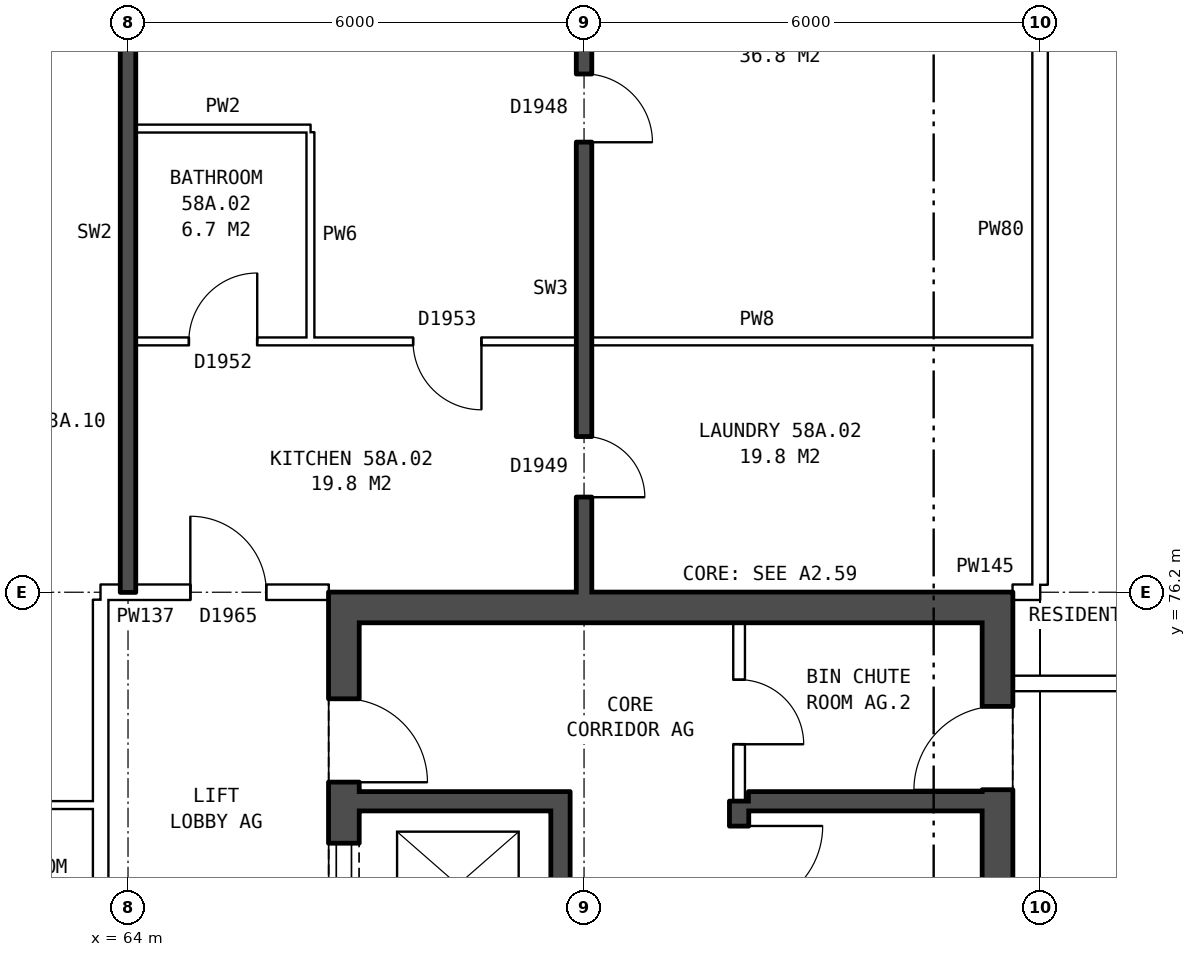
"""IFC4 building model, lengths in metres.
Left out: names, types, materials, properties, quantities, classifications, styles, units other than length and angle.
Written with IfcOpenShell. Run it as: python <this file> out.ifc"""

import sys

from ifc_helpers import new_model, si_unit, direction, frame, frame_2d, origin, place, context, subcontext, project, spatial, rectangle, extrude, element, fill, save


model = new_model("IFC4")
c1 = context("Model", 3, precision=1e-05, world=origin(), true_north=direction((0.0, 1.0)))
c2 = subcontext(c1, "Body", "Model", "MODEL_VIEW")
j1 = project(units=[si_unit("LENGTHUNIT", "METRE"), si_unit("PLANEANGLEUNIT", "RADIAN")], contexts=[c1])
p1 = place(None, origin())
s1 = spatial("IfcSite", under=j1, at=p1, CompositionType="ELEMENT")
p2 = place(p1, origin())
s2 = spatial("IfcBuilding", under=s1, at=p2, CompositionType="ELEMENT")
p3 = place(p2, frame((0.0, 0.0, 205.9)))
s3 = spatial("IfcBuildingStorey", under=s2, at=p3, CompositionType="ELEMENT", Elevation=205.9)
p4 = place(p3, frame((66.84, 63.8, 0.0), z_axis=(0.0, 0.0, 1.0), x_axis=(0.0, 1.0, 0.0)))
e1 = element("IfcWall", 1, at=p4, inside=s3, PredefinedType="SHEAR", context=c2, shape_type="SweptSolid", body=[
    extrude(rectangle(XDim=12.4, YDim=0.4, at=frame_2d((6.2, 0.0))), origin(), (0.0, 0.0, 1.0), 2.85),
])
p5 = place(p4, frame((1.325, 0.0, 0.0)))
e2 = element("IfcOpeningElement", 2, at=p5, cuts=e1, PredefinedType="OPENING", context=c2, shape_type="SweptSolid", body=[
    extrude(rectangle(XDim=1.1, YDim=2.1, at=frame_2d((0.55, 1.05))), frame((0.0, 0.21, 0.0), z_axis=(0.0, -1.0, 0.0), x_axis=(1.0, 0.0, 0.0)), (0.0, 0.0, 1.0), 0.42),
])
p6 = place(p4, frame((3.6, 0.0, 0.0)))
e3 = element("IfcOpeningElement", 3, at=p6, cuts=e1, PredefinedType="OPENING", context=c2, shape_type="SweptSolid", body=[
    extrude(rectangle(XDim=1.1, YDim=2.1, at=frame_2d((0.55, 1.05))), frame((0.0, 0.21, 0.0), z_axis=(0.0, -1.0, 0.0), x_axis=(1.0, 0.0, 0.0)), (0.0, 0.0, 1.0), 0.42),
])
p7 = place(p4, frame((5.8, 0.0, 0.0)))
e4 = element("IfcOpeningElement", 4, at=p7, cuts=e1, PredefinedType="OPENING", context=c2, shape_type="SweptSolid", body=[
    extrude(rectangle(XDim=1.1, YDim=2.1, at=frame_2d((0.55, 1.05))), frame((0.0, 0.21, 0.0), z_axis=(0.0, -1.0, 0.0), x_axis=(1.0, 0.0, 0.0)), (0.0, 0.0, 1.0), 0.42),
])
p8 = place(p4, frame((8.0, 0.0, 0.0)))
e5 = element("IfcOpeningElement", 5, at=p8, cuts=e1, PredefinedType="OPENING", context=c2, shape_type="SweptSolid", body=[
    extrude(rectangle(XDim=1.1, YDim=2.1, at=frame_2d((0.55, 1.05))), frame((0.0, 0.21, 0.0), z_axis=(0.0, -1.0, 0.0), x_axis=(1.0, 0.0, 0.0)), (0.0, 0.0, 1.0), 0.42),
])
p9 = place(p4, frame((9.9, 0.0, 0.0)))
e6 = element("IfcOpeningElement", 6, at=p9, cuts=e1, PredefinedType="OPENING", context=c2, shape_type="SweptSolid", body=[
    extrude(rectangle(XDim=1.1, YDim=2.1, at=frame_2d((0.55, 1.05))), frame((0.0, 0.21, 0.0), z_axis=(0.0, -1.0, 0.0), x_axis=(1.0, 0.0, 0.0)), (0.0, 0.0, 1.0), 0.42),
])
p10 = place(p3, frame((75.44, 63.8, 0.0), z_axis=(0.0, 0.0, 1.0), x_axis=(0.0, 1.0, 0.0)))
e7 = element("IfcWall", 7, at=p10, inside=s3, PredefinedType="SHEAR", context=c2, shape_type="SweptSolid", body=[
    extrude(rectangle(XDim=12.4, YDim=0.4, at=frame_2d((6.2, 0.0))), origin(), (0.0, 0.0, 1.0), 2.85),
])
p11 = place(p10, frame((9.8, 0.0, 0.0)))
e8 = element("IfcOpeningElement", 8, at=p11, cuts=e7, PredefinedType="OPENING", context=c2, shape_type="SweptSolid", body=[
    extrude(rectangle(XDim=1.1, YDim=2.1, at=frame_2d((0.55, 1.05))), frame((0.0, 0.21, 0.0), z_axis=(0.0, -1.0, 0.0), x_axis=(1.0, 0.0, 0.0)), (0.0, 0.0, 1.0), 0.42),
])
p12 = place(p3, frame((67.04, 76.0, 0.0), z_axis=(0.0, 0.0, 1.0), x_axis=(1.0, 0.0, 0.0)))
e9 = element("IfcWall", 9, at=p12, inside=s3, PredefinedType="SHEAR", context=c2, shape_type="SweptSolid", body=[
    extrude(rectangle(XDim=8.2, YDim=0.4, at=frame_2d((4.1, 0.0))), origin(), (0.0, 0.0, 1.0), 2.85),
])
p13 = place(p3, frame((67.04, 73.45, 0.0), z_axis=(0.0, 0.0, 1.0), x_axis=(1.0, 0.0, 0.0)))
e10 = element("IfcWall", 10, at=p13, inside=s3, PredefinedType="SHEAR", context=c2, shape_type="SweptSolid", body=[
    extrude(rectangle(XDim=2.525, YDim=0.25, at=frame_2d((1.262, 0.0))), origin(), (0.0, 0.0, 1.0), 2.85),
])
p14 = place(p3, frame((72.165, 73.45, 0.0), z_axis=(0.0, 0.0, 1.0), x_axis=(1.0, 0.0, 0.0)))
e11 = element("IfcWall", 11, at=p14, inside=s3, PredefinedType="SHEAR", context=c2, shape_type="SweptSolid", body=[
    extrude(rectangle(XDim=3.075, YDim=0.25, at=frame_2d((1.538, 0.0))), origin(), (0.0, 0.0, 1.0), 2.85),
])
p15 = place(p3, frame((69.69, 66.975, 0.0), z_axis=(0.0, 0.0, 1.0), x_axis=(0.0, 1.0, 0.0)))
e12 = element("IfcWall", 12, at=p15, inside=s3, PredefinedType="SHEAR", context=c2, shape_type="SweptSolid", body=[
    extrude(rectangle(XDim=6.6, YDim=0.25, at=frame_2d((3.3, 0.0))), origin(), (0.0, 0.0, 1.0), 2.85),
])
p16 = place(p3, frame((72.04, 66.225, 0.0), z_axis=(0.0, 0.0, 1.0), x_axis=(0.0, 1.0, 0.0)))
e13 = element("IfcWall", 13, at=p16, inside=s3, PredefinedType="SHEAR", context=c2, shape_type="SweptSolid", body=[
    extrude(rectangle(XDim=7.225, YDim=0.25, at=frame_2d((3.612, 0.0))), origin(), (0.0, 0.0, 1.0), 2.85),
])
p17 = place(p16, frame((5.8, 0.0, 0.0)))
e14 = element("IfcOpeningElement", 14, at=p17, cuts=e13, PredefinedType="OPENING", context=c2, shape_type="SweptSolid", body=[
    extrude(rectangle(XDim=1.1, YDim=2.1, at=frame_2d((0.55, 1.05))), frame((0.0, 0.135, 0.0), z_axis=(0.0, -1.0, 0.0), x_axis=(1.0, 0.0, 0.0)), (0.0, 0.0, 1.0), 0.27),
])
p18 = place(p3, frame((72.04, 73.45, 0.0), z_axis=(0.0, 0.0, 1.0), x_axis=(0.0, 1.0, 0.0)))
e15 = element("IfcWall", 15, at=p18, inside=s3, PredefinedType="PARTITIONING", context=c2, shape_type="SweptSolid", body=[
    extrude(rectangle(XDim=2.35, YDim=0.15, at=frame_2d((1.175, 0.0))), origin(), (0.0, 0.0, 1.0), 2.85),
])
p19 = place(p18, frame((0.75, 0.0, 0.0)))
e16 = element("IfcOpeningElement", 16, at=p19, cuts=e15, PredefinedType="OPENING", context=c2, shape_type="SweptSolid", body=[
    extrude(rectangle(XDim=0.85, YDim=2.1, at=frame_2d((0.425, 1.05))), frame((0.0, 0.085, 0.0), z_axis=(0.0, -1.0, 0.0), x_axis=(1.0, 0.0, 0.0)), (0.0, 0.0, 1.0), 0.17),
])
p20 = place(p3, frame((63.64, 63.9, 0.0), z_axis=(0.0, 0.0, 1.0), x_axis=(0.0, 1.0, 0.0)))
e17 = element("IfcWall", 17, at=p20, inside=s3, PredefinedType="PARTITIONING", context=c2, shape_type="SweptSolid", body=[
    extrude(rectangle(XDim=12.2, YDim=0.2, at=frame_2d((6.1, 0.0))), origin(), (0.0, 0.0, 1.0), 2.85),
])
p21 = place(p20, frame((5.1, 0.0, 0.0)))
e18 = element("IfcOpeningElement", 18, at=p21, cuts=e17, PredefinedType="OPENING", context=c2, shape_type="SweptSolid", body=[
    extrude(rectangle(XDim=2.0, YDim=2.1, at=frame_2d((1.0, 1.05))), frame((0.0, 0.11, 0.0), z_axis=(0.0, -1.0, 0.0), x_axis=(1.0, 0.0, 0.0)), (0.0, 0.0, 1.0), 0.22),
])
p22 = place(p3, frame((61.0, 73.4, 0.0), z_axis=(0.0, 0.0, 1.0), x_axis=(1.0, 0.0, 0.0)))
e19 = element("IfcWall", 19, at=p22, inside=s3, PredefinedType="PARTITIONING", context=c2, shape_type="SweptSolid", body=[
    extrude(rectangle(XDim=2.64, YDim=0.1, at=frame_2d((1.32, 0.0))), origin(), (0.0, 0.0, 1.0), 2.85),
])
p23 = place(p3, frame((75.64, 75.0, 0.0), z_axis=(0.0, 0.0, 1.0), x_axis=(1.0, 0.0, 0.0)))
e20 = element("IfcWall", 20, at=p23, inside=s3, PredefinedType="PARTITIONING", context=c2, shape_type="SweptSolid", body=[
    extrude(rectangle(XDim=7.585, YDim=0.2, at=frame_2d((3.792, 0.0))), origin(), (0.0, 0.0, 1.0), 2.85),
])
p24 = place(p23, frame((3.343, 0.0, 0.0)))
e21 = element("IfcOpeningElement", 21, at=p24, cuts=e20, PredefinedType="OPENING", context=c2, shape_type="SweptSolid", body=[
    extrude(rectangle(XDim=0.9, YDim=2.1, at=frame_2d((0.45, 1.05))), frame((0.0, 0.11, 0.0), z_axis=(0.0, -1.0, 0.0), x_axis=(1.0, 0.0, 0.0)), (0.0, 0.0, 1.0), 0.22),
])
p25 = place(p3, frame((63.64, 76.2, 0.0), z_axis=(0.0, 0.0, 1.0), x_axis=(1.0, 0.0, 0.0)))
e22 = element("IfcWall", 22, at=p25, inside=s3, PredefinedType="PARTITIONING", context=c2, shape_type="SweptSolid", body=[
    extrude(rectangle(XDim=3.0, YDim=0.2, at=frame_2d((1.5, 0.0))), origin(), (0.0, 0.0, 1.0), 2.85),
])
p26 = place(p25, frame((1.18, 0.0, 0.0)))
e23 = element("IfcOpeningElement", 23, at=p26, cuts=e22, PredefinedType="OPENING", context=c2, shape_type="SweptSolid", body=[
    extrude(rectangle(XDim=1.0, YDim=2.1, at=frame_2d((0.5, 1.05))), frame((0.0, 0.11, 0.0), z_axis=(0.0, -1.0, 0.0), x_axis=(1.0, 0.0, 0.0)), (0.0, 0.0, 1.0), 0.22),
])
p27 = place(p3, frame((75.64, 76.2, 0.0), z_axis=(0.0, 0.0, 1.0), x_axis=(1.0, 0.0, 0.0)))
e24 = element("IfcWall", 24, at=p27, inside=s3, PredefinedType="PARTITIONING", context=c2, shape_type="SweptSolid", body=[
    extrude(rectangle(XDim=0.36, YDim=0.2, at=frame_2d((0.18, 0.0))), origin(), (0.0, 0.0, 1.0), 2.85),
])
p28 = place(p3, frame((64.1, 79.5, 0.0), z_axis=(0.0, 0.0, 1.0), x_axis=(1.0, 0.0, 0.0)))
e25 = element("IfcWall", 25, at=p28, inside=s3, PredefinedType="PARTITIONING", context=c2, shape_type="SweptSolid", body=[
    extrude(rectangle(XDim=11.8, YDim=0.1, at=frame_2d((5.9, 0.0))), origin(), (0.0, 0.0, 1.0), 2.85),
])
p29 = place(p28, frame((3.65, 0.0, 0.0)))
e26 = element("IfcOpeningElement", 26, at=p29, cuts=e25, PredefinedType="OPENING", context=c2, shape_type="SweptSolid", body=[
    extrude(rectangle(XDim=0.9, YDim=2.1, at=frame_2d((0.45, 1.05))), frame((0.0, 0.06, 0.0), z_axis=(0.0, -1.0, 0.0), x_axis=(1.0, 0.0, 0.0)), (0.0, 0.0, 1.0), 0.12),
])
p30 = place(p28, frame((0.7, 0.0, 0.0)))
e27 = element("IfcOpeningElement", 27, at=p30, cuts=e25, PredefinedType="OPENING", context=c2, shape_type="SweptSolid", body=[
    extrude(rectangle(XDim=0.9, YDim=2.1, at=frame_2d((0.45, 1.05))), frame((0.0, 0.06, 0.0), z_axis=(0.0, -1.0, 0.0), x_axis=(1.0, 0.0, 0.0)), (0.0, 0.0, 1.0), 0.12),
])
p31 = place(p3, frame((64.1, 82.3, 0.0), z_axis=(0.0, 0.0, 1.0), x_axis=(1.0, 0.0, 0.0)))
e28 = element("IfcWall", 28, at=p31, inside=s3, PredefinedType="PARTITIONING", context=c2, shape_type="SweptSolid", body=[
    extrude(rectangle(XDim=2.3, YDim=0.1, at=frame_2d((1.15, 0.0))), origin(), (0.0, 0.0, 1.0), 2.85),
])
p32 = place(p3, frame((64.0, 76.2, 0.0), z_axis=(0.0, 0.0, 1.0), x_axis=(0.0, 1.0, 0.0)))
e29 = element("IfcWall", 29, at=p32, inside=s3, PredefinedType="SOLIDWALL", context=c2, shape_type="SweptSolid", body=[
    extrude(rectangle(XDim=9.44, YDim=0.2, at=frame_2d((4.72, 0.0))), origin(), (0.0, 0.0, 1.0), 2.85),
])
p33 = place(p3, frame((66.4, 79.55, 0.0), z_axis=(0.0, 0.0, 1.0), x_axis=(0.0, 1.0, 0.0)))
e30 = element("IfcWall", 30, at=p33, inside=s3, PredefinedType="PARTITIONING", context=c2, shape_type="SweptSolid", body=[
    extrude(rectangle(XDim=2.7, YDim=0.1, at=frame_2d((1.35, 0.0))), origin(), (0.0, 0.0, 1.0), 2.85),
])
p34 = place(p3, frame((70.0, 76.2, 0.0), z_axis=(0.0, 0.0, 1.0), x_axis=(0.0, 1.0, 0.0)))
e31 = element("IfcWall", 31, at=p34, inside=s3, PredefinedType="SOLIDWALL", context=c2, shape_type="SweptSolid", body=[
    extrude(rectangle(XDim=9.44, YDim=0.2, at=frame_2d((4.72, 0.0))), origin(), (0.0, 0.0, 1.0), 2.85),
])
p35 = place(p34, frame((5.92, 0.0, 0.0)))
e32 = element("IfcOpeningElement", 32, at=p35, cuts=e31, PredefinedType="OPENING", context=c2, shape_type="SweptSolid", body=[
    extrude(rectangle(XDim=0.9, YDim=2.1, at=frame_2d((0.45, 1.05))), frame((0.0, 0.11, 0.0), z_axis=(0.0, -1.0, 0.0), x_axis=(1.0, 0.0, 0.0)), (0.0, 0.0, 1.0), 0.22),
])
p36 = place(p34, frame((1.25, 0.0, 0.0)))
e33 = element("IfcOpeningElement", 33, at=p36, cuts=e31, PredefinedType="OPENING", context=c2, shape_type="SweptSolid", body=[
    extrude(rectangle(XDim=0.8, YDim=2.1, at=frame_2d((0.4, 1.05))), frame((0.0, 0.11, 0.0), z_axis=(0.0, -1.0, 0.0), x_axis=(1.0, 0.0, 0.0)), (0.0, 0.0, 1.0), 0.22),
])
p37 = place(p3, frame((76.0, 76.3, 0.0), z_axis=(0.0, 0.0, 1.0), x_axis=(0.0, 1.0, 0.0)))
e34 = element("IfcWall", 34, at=p37, inside=s3, PredefinedType="PARTITIONING", context=c2, shape_type="SweptSolid", body=[
    extrude(rectangle(XDim=9.34, YDim=0.2, at=frame_2d((4.67, 0.0))), origin(), (0.0, 0.0, 1.0), 2.85),
])
p38 = place(p8, origin())
e35 = element("IfcDoor", 35, at=p38, inside=s3, OperationType="DOUBLE_DOOR_SLIDING", PredefinedType="DOOR", context=c2, shape_type="SweptSolid", body=[
    extrude(rectangle(XDim=1.1, YDim=2.1, at=frame_2d((0.55, 1.05))), frame((0.0, -0.135, 0.0), z_axis=(0.0, -1.0, 0.0), x_axis=(1.0, 0.0, 0.0)), (0.0, 0.0, 1.0), 0.05),
])
fill(e5, e35)
p39 = place(p9, frame((1.1, 0.0, 0.0), z_axis=(0.0, 0.0, 1.0), x_axis=(-1.0, 0.0, 0.0)))
e36 = element("IfcDoor", 36, at=p39, inside=s3, OperationType="SINGLE_SWING_RIGHT", PredefinedType="DOOR", context=c2, shape_type="SweptSolid", body=[
    extrude(rectangle(XDim=1.1, YDim=2.1, at=frame_2d((0.55, 1.05))), frame((0.0, 0.185, 0.0), z_axis=(0.0, -1.0, 0.0), x_axis=(1.0, 0.0, 0.0)), (0.0, 0.0, 1.0), 0.05),
])
fill(e6, e36)
p40 = place(p17, frame((1.1, 0.0, 0.0), z_axis=(0.0, 0.0, 1.0), x_axis=(-1.0, 0.0, 0.0)))
e37 = element("IfcDoor", 37, at=p40, inside=s3, OperationType="SINGLE_SWING_LEFT", PredefinedType="DOOR", context=c2, shape_type="SweptSolid", body=[
    extrude(rectangle(XDim=1.1, YDim=2.1, at=frame_2d((0.55, 1.05))), frame((0.0, 0.025, 0.0), z_axis=(0.0, -1.0, 0.0), x_axis=(1.0, 0.0, 0.0)), (0.0, 0.0, 1.0), 0.05),
])
fill(e14, e37)
p41 = place(p19, frame((0.85, 0.0, 0.0), z_axis=(0.0, 0.0, 1.0), x_axis=(-1.0, 0.0, 0.0)))
e38 = element("IfcDoor", 38, at=p41, inside=s3, OperationType="SINGLE_SWING_RIGHT", PredefinedType="DOOR", context=c2, shape_type="SweptSolid", body=[
    extrude(rectangle(XDim=0.85, YDim=2.1, at=frame_2d((0.425, 1.05))), frame((0.0, 0.025, 0.0), z_axis=(0.0, -1.0, 0.0), x_axis=(1.0, 0.0, 0.0)), (0.0, 0.0, 1.0), 0.05),
])
fill(e16, e38)
p42 = place(p11, origin())
e39 = element("IfcDoor", 39, at=p42, inside=s3, OperationType="SINGLE_SWING_LEFT", PredefinedType="DOOR", context=c2, shape_type="SweptSolid", body=[
    extrude(rectangle(XDim=1.1, YDim=2.1, at=frame_2d((0.55, 1.05))), frame((0.0, 0.185, 0.0), z_axis=(0.0, -1.0, 0.0), x_axis=(1.0, 0.0, 0.0)), (0.0, 0.0, 1.0), 0.05),
])
fill(e8, e39)
p43 = place(p35, frame((0.9, 0.0, 0.0), z_axis=(0.0, 0.0, 1.0), x_axis=(-1.0, 0.0, 0.0)))
e40 = element("IfcDoor", 40, at=p43, inside=s3, OperationType="SINGLE_SWING_RIGHT", PredefinedType="DOOR", context=c2, shape_type="SweptSolid", body=[
    extrude(rectangle(XDim=0.9, YDim=2.1, at=frame_2d((0.45, 1.05))), frame((0.0, 0.025, 0.0), z_axis=(0.0, -1.0, 0.0), x_axis=(1.0, 0.0, 0.0)), (0.0, 0.0, 1.0), 0.05),
])
fill(e32, e40)
p44 = place(p26, origin())
e41 = element("IfcDoor", 41, at=p44, inside=s3, OperationType="SINGLE_SWING_LEFT", PredefinedType="DOOR", context=c2, shape_type="SweptSolid", body=[
    extrude(rectangle(XDim=1.0, YDim=2.1, at=frame_2d((0.5, 1.05))), frame((0.0, 0.025, 0.0), z_axis=(0.0, -1.0, 0.0), x_axis=(1.0, 0.0, 0.0)), (0.0, 0.0, 1.0), 0.05),
])
fill(e23, e41)
p45 = place(p29, frame((0.9, 0.0, 0.0), z_axis=(0.0, 0.0, 1.0), x_axis=(-1.0, 0.0, 0.0)))
e42 = element("IfcDoor", 42, at=p45, inside=s3, OperationType="SINGLE_SWING_LEFT", PredefinedType="DOOR", context=c2, shape_type="SweptSolid", body=[
    extrude(rectangle(XDim=0.9, YDim=2.1, at=frame_2d((0.45, 1.05))), frame((0.0, 0.025, 0.0), z_axis=(0.0, -1.0, 0.0), x_axis=(1.0, 0.0, 0.0)), (0.0, 0.0, 1.0), 0.05),
])
fill(e26, e42)
p46 = place(p36, frame((0.8, 0.0, 0.0), z_axis=(0.0, 0.0, 1.0), x_axis=(-1.0, 0.0, 0.0)))
e43 = element("IfcDoor", 43, at=p46, inside=s3, OperationType="SINGLE_SWING_RIGHT", PredefinedType="DOOR", context=c2, shape_type="SweptSolid", body=[
    extrude(rectangle(XDim=0.8, YDim=2.1, at=frame_2d((0.4, 1.05))), frame((0.0, 0.025, 0.0), z_axis=(0.0, -1.0, 0.0), x_axis=(1.0, 0.0, 0.0)), (0.0, 0.0, 1.0), 0.05),
])
fill(e33, e43)
p47 = place(p30, origin())
e44 = element("IfcDoor", 44, at=p47, inside=s3, OperationType="SINGLE_SWING_RIGHT", PredefinedType="DOOR", context=c2, shape_type="SweptSolid", body=[
    extrude(rectangle(XDim=0.9, YDim=2.1, at=frame_2d((0.45, 1.05))), frame((0.0, 0.025, 0.0), z_axis=(0.0, -1.0, 0.0), x_axis=(1.0, 0.0, 0.0)), (0.0, 0.0, 1.0), 0.05),
])
fill(e27, e44)
save(model, sys.argv[1])
